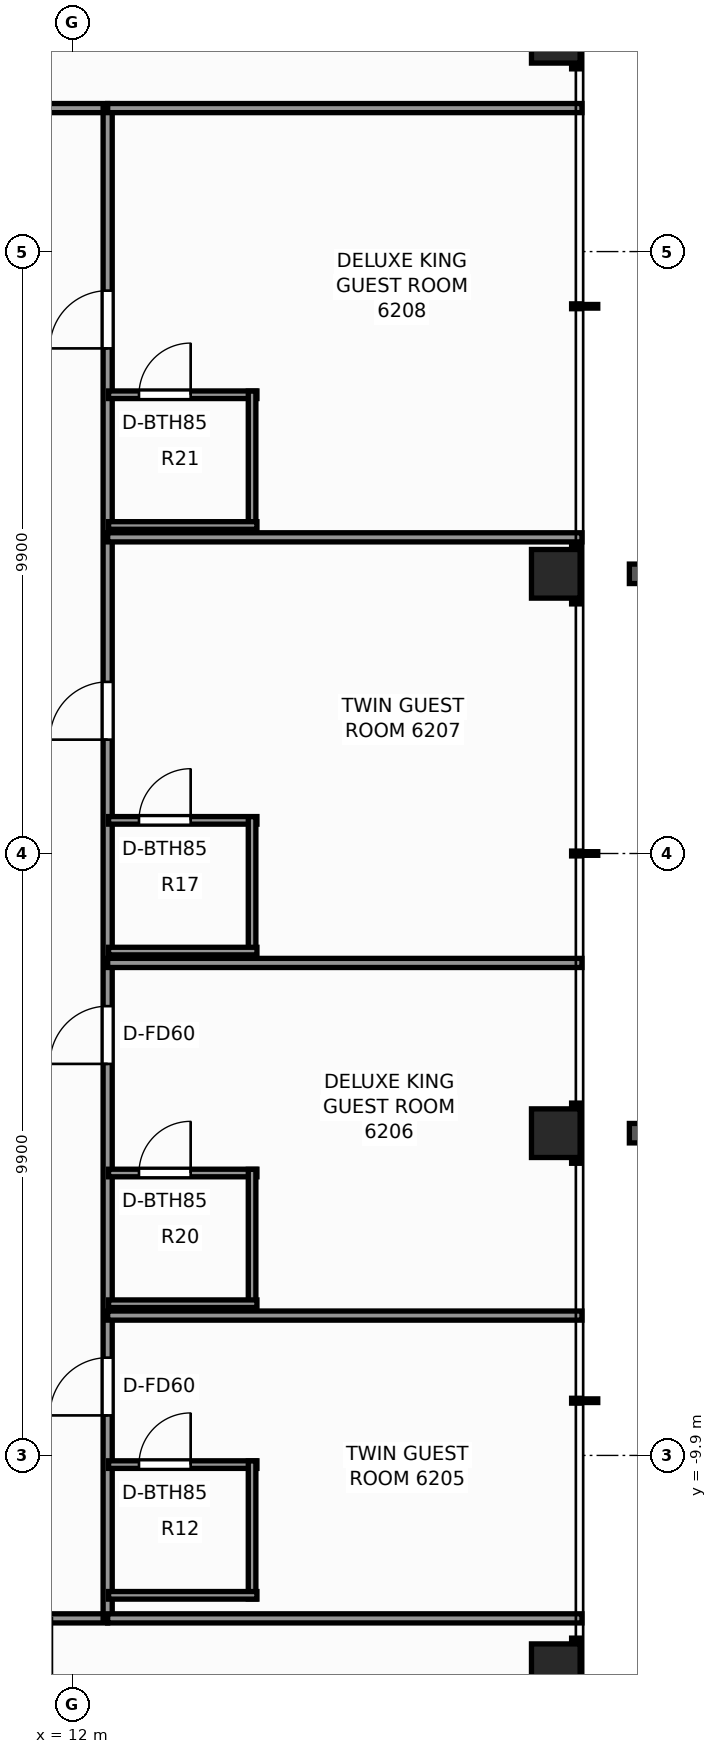
"""IFC4 building model, lengths in metres.
Left out: names, types, materials, properties, quantities, classifications, styles, units other than length and angle.
Written with IfcOpenShell. Run it as: python <this file> out.ifc"""

import sys

from ifc_helpers import new_model, si_unit, direction, frame, frame_2d, origin, origin_2d, place, context, subcontext, project, spatial, rectangle, extrude, element, fill, save


model = new_model("IFC4")
c1 = context("Model", 3, precision=1e-05, world=origin(), true_north=direction((0.0, 1.0)))
c2 = subcontext(c1, "Body", "Model", "MODEL_VIEW")
j1 = project(units=[si_unit("LENGTHUNIT", "METRE"), si_unit("PLANEANGLEUNIT", "RADIAN")], contexts=[c1])
p1 = place(None, origin())
s1 = spatial("IfcSite", under=j1, at=p1, CompositionType="ELEMENT")
p2 = place(p1, origin())
s2 = spatial("IfcBuilding", under=s1, at=p2, CompositionType="ELEMENT")
p3 = place(p2, frame((0.0, 0.0, 213.0)))
s3 = spatial("IfcBuildingStorey", under=s2, at=p3, CompositionType="ELEMENT", Elevation=213.0)
for number, where, z_axis, x_axis in (
    (1, (19.95, -13.4, 0.0), (0.0, 0.0, 1.0), (1.0, 0.0, 0.0)),
    (2, (19.95, -4.6, 0.0), (0.0, 0.0, 1.0), (1.0, 0.0, 0.0)),
    (3, (19.95, 4.6, 0.0), (0.0, 0.0, 1.0), (1.0, 0.0, 0.0)),
    (4, (19.95, 13.4, 0.0), (0.0, 0.0, 1.0), (1.0, 0.0, 0.0)),
):
    element("IfcColumn", number, at=place(p3, frame(where, z_axis=z_axis, x_axis=x_axis)), inside=s3, PredefinedType="COLUMN", context=c2, shape_type="SweptSolid", body=[
        extrude(rectangle(XDim=0.8, YDim=0.8, at=origin_2d()), origin(), (0.0, 0.0, 1.0), 3.3),
    ])
p4 = place(p3, frame((-12.58, -12.58, 0.0), z_axis=(0.0, 0.0, 1.0), x_axis=(1.0, 0.0, 0.0)))
e5 = element("IfcWall", 5, at=p4, inside=s3, PredefinedType="PARTITIONING", context=c2, shape_type="SweptSolid", body=[
    extrude(rectangle(XDim=25.16, YDim=0.15, at=frame_2d((12.58, 0.0))), origin(), (0.0, 0.0, 1.0), 2.369),
])
p5 = place(p4, frame((3.919, 0.0, 0.0)))
e6 = element("IfcOpeningElement", 6, at=p5, cuts=e5, PredefinedType="OPENING", context=c2, shape_type="SweptSolid", body=[
    extrude(rectangle(XDim=0.9, YDim=2.06, at=frame_2d((0.45, 1.03))), frame((0.0, 0.085, 0.0), z_axis=(0.0, -1.0, 0.0), x_axis=(1.0, 0.0, 0.0)), (0.0, 0.0, 1.0), 0.17),
])
p6 = place(p4, frame((8.951, 0.0, 0.0)))
e7 = element("IfcOpeningElement", 7, at=p6, cuts=e5, PredefinedType="OPENING", context=c2, shape_type="SweptSolid", body=[
    extrude(rectangle(XDim=0.9, YDim=2.06, at=frame_2d((0.45, 1.03))), frame((0.0, 0.085, 0.0), z_axis=(0.0, -1.0, 0.0), x_axis=(1.0, 0.0, 0.0)), (0.0, 0.0, 1.0), 0.17),
])
p7 = place(p4, frame((10.78, 0.0, 0.0)))
e8 = element("IfcOpeningElement", 8, at=p7, cuts=e5, PredefinedType="OPENING", context=c2, shape_type="SweptSolid", body=[
    extrude(rectangle(XDim=0.9, YDim=2.06, at=frame_2d((0.45, 1.03))), frame((0.0, 0.085, 0.0), z_axis=(0.0, -1.0, 0.0), x_axis=(1.0, 0.0, 0.0)), (0.0, 0.0, 1.0), 0.17),
])
p8 = place(p4, frame((13.749, 0.0, 0.0)))
e9 = element("IfcOpeningElement", 9, at=p8, cuts=e5, PredefinedType="OPENING", context=c2, shape_type="SweptSolid", body=[
    extrude(rectangle(XDim=0.95, YDim=2.06, at=frame_2d((0.475, 1.03))), frame((0.0, 0.085, 0.0), z_axis=(0.0, -1.0, 0.0), x_axis=(1.0, 0.0, 0.0)), (0.0, 0.0, 1.0), 0.17),
])
p9 = place(p4, frame((18.268, 0.0, 0.0)))
e10 = element("IfcOpeningElement", 10, at=p9, cuts=e5, PredefinedType="OPENING", context=c2, shape_type="SweptSolid", body=[
    extrude(rectangle(XDim=0.9, YDim=2.06, at=frame_2d((0.45, 1.03))), frame((0.0, 0.085, 0.0), z_axis=(0.0, -1.0, 0.0), x_axis=(1.0, 0.0, 0.0)), (0.0, 0.0, 1.0), 0.17),
])
p10 = place(p4, frame((20.283, 0.0, 0.0)))
e11 = element("IfcOpeningElement", 11, at=p10, cuts=e5, PredefinedType="OPENING", context=c2, shape_type="SweptSolid", body=[
    extrude(rectangle(XDim=0.95, YDim=2.06, at=frame_2d((0.475, 1.03))), frame((0.0, 0.085, 0.0), z_axis=(0.0, -1.0, 0.0), x_axis=(1.0, 0.0, 0.0)), (0.0, 0.0, 1.0), 0.17),
])
p11 = place(p3, frame((-12.58, 12.26, 0.0), z_axis=(0.0, 0.0, 1.0), x_axis=(1.0, 0.0, 0.0)))
e12 = element("IfcWall", 12, at=p11, inside=s3, PredefinedType="PARTITIONING", context=c2, shape_type="SweptSolid", body=[
    extrude(rectangle(XDim=25.16, YDim=0.15, at=frame_2d((12.58, 0.0))), origin(), (0.0, 0.0, 1.0), 2.369),
])
p12 = place(p11, frame((3.133, 0.0, 0.0)))
e13 = element("IfcOpeningElement", 13, at=p12, cuts=e12, PredefinedType="OPENING", context=c2, shape_type="SweptSolid", body=[
    extrude(rectangle(XDim=0.9, YDim=2.06, at=frame_2d((0.45, 1.03))), frame((0.0, 0.085, 0.0), z_axis=(0.0, -1.0, 0.0), x_axis=(1.0, 0.0, 0.0)), (0.0, 0.0, 1.0), 0.17),
])
p13 = place(p11, frame((9.188, 0.0, 0.0)))
e14 = element("IfcOpeningElement", 14, at=p13, cuts=e12, PredefinedType="OPENING", context=c2, shape_type="SweptSolid", body=[
    extrude(rectangle(XDim=0.95, YDim=2.06, at=frame_2d((0.475, 1.03))), frame((0.0, 0.085, 0.0), z_axis=(0.0, -1.0, 0.0), x_axis=(1.0, 0.0, 0.0)), (0.0, 0.0, 1.0), 0.17),
])
p14 = place(p11, frame((13.087, 0.0, 0.0)))
e15 = element("IfcOpeningElement", 15, at=p14, cuts=e12, PredefinedType="OPENING", context=c2, shape_type="SweptSolid", body=[
    extrude(rectangle(XDim=0.95, YDim=2.06, at=frame_2d((0.475, 1.03))), frame((0.0, 0.085, 0.0), z_axis=(0.0, -1.0, 0.0), x_axis=(1.0, 0.0, 0.0)), (0.0, 0.0, 1.0), 0.17),
])
p15 = place(p11, frame((19.665, 0.0, 0.0)))
e16 = element("IfcOpeningElement", 16, at=p15, cuts=e12, PredefinedType="OPENING", context=c2, shape_type="SweptSolid", body=[
    extrude(rectangle(XDim=0.9, YDim=2.06, at=frame_2d((0.45, 1.03))), frame((0.0, 0.085, 0.0), z_axis=(0.0, -1.0, 0.0), x_axis=(1.0, 0.0, 0.0)), (0.0, 0.0, 1.0), 0.17),
])
p16 = place(p3, frame((12.58, -12.58, 0.0), z_axis=(0.0, 0.0, 1.0), x_axis=(0.0, 1.0, 0.0)))
e17 = element("IfcWall", 17, at=p16, inside=s3, PredefinedType="PARTITIONING", context=c2, shape_type="SweptSolid", body=[
    extrude(rectangle(XDim=24.84, YDim=0.15, at=frame_2d((12.42, 0.0))), origin(), (0.0, 0.0, 1.0), 2.369),
])
p17 = place(p16, frame((3.338, 0.0, 0.0)))
e18 = element("IfcOpeningElement", 18, at=p17, cuts=e17, PredefinedType="OPENING", context=c2, shape_type="SweptSolid", body=[
    extrude(rectangle(XDim=0.95, YDim=2.06, at=frame_2d((0.475, 1.03))), frame((0.0, 0.085, 0.0), z_axis=(0.0, -1.0, 0.0), x_axis=(1.0, 0.0, 0.0)), (0.0, 0.0, 1.0), 0.17),
])
p18 = place(p16, frame((9.119, 0.0, 0.0)))
e19 = element("IfcOpeningElement", 19, at=p18, cuts=e17, PredefinedType="OPENING", context=c2, shape_type="SweptSolid", body=[
    extrude(rectangle(XDim=0.95, YDim=2.06, at=frame_2d((0.475, 1.03))), frame((0.0, 0.085, 0.0), z_axis=(0.0, -1.0, 0.0), x_axis=(1.0, 0.0, 0.0)), (0.0, 0.0, 1.0), 0.17),
])
p19 = place(p16, frame((14.452, 0.0, 0.0)))
e20 = element("IfcOpeningElement", 20, at=p19, cuts=e17, PredefinedType="OPENING", context=c2, shape_type="SweptSolid", body=[
    extrude(rectangle(XDim=0.95, YDim=2.06, at=frame_2d((0.475, 1.03))), frame((0.0, 0.085, 0.0), z_axis=(0.0, -1.0, 0.0), x_axis=(1.0, 0.0, 0.0)), (0.0, 0.0, 1.0), 0.17),
])
p20 = place(p16, frame((20.887, 0.0, 0.0)))
e21 = element("IfcOpeningElement", 21, at=p20, cuts=e17, PredefinedType="OPENING", context=c2, shape_type="SweptSolid", body=[
    extrude(rectangle(XDim=0.95, YDim=2.06, at=frame_2d((0.475, 1.03))), frame((0.0, 0.085, 0.0), z_axis=(0.0, -1.0, 0.0), x_axis=(1.0, 0.0, 0.0)), (0.0, 0.0, 1.0), 0.17),
])
for number, where, z_axis, x_axis in (
    (22, (12.58, -12.58, 0.0), (0.0, 0.0, 1.0), (1.0, 0.0, 0.0)),
    (23, (12.58, 12.26, 0.0), (0.0, 0.0, 1.0), (1.0, 0.0, 0.0)),
):
    element("IfcWall", number, at=place(p3, frame(where, z_axis=z_axis, x_axis=x_axis)), inside=s3, PredefinedType="PARTITIONING", context=c2, shape_type="SweptSolid", body=[
        extrude(rectangle(XDim=7.8, YDim=0.15, at=frame_2d((3.9, 0.0))), origin(), (0.0, 0.0, 1.0), 2.369),
    ])
p21 = place(p3, frame((12.58, -7.6, 0.0), z_axis=(0.0, 0.0, 1.0), x_axis=(1.0, 0.0, 0.0)))
e24 = element("IfcWall", 24, at=p21, inside=s3, PredefinedType="PARTITIONING", context=c2, shape_type="SweptSolid", body=[
    extrude(rectangle(XDim=7.8, YDim=0.15, at=frame_2d((3.9, 0.0))), origin(), (0.0, 0.0, 1.0), 2.453),
])
p22 = place(p3, frame((12.595, -10.051, 0.0), z_axis=(0.0, 0.0, 1.0), x_axis=(1.0, 0.0, 0.0)))
e25 = element("IfcWall", 25, at=p22, inside=s3, PredefinedType="PARTITIONING", context=c2, shape_type="SweptSolid", body=[
    extrude(rectangle(XDim=2.44, YDim=0.125, at=frame_2d((1.22, 0.0))), origin(), (0.0, 0.0, 1.0), 3.08),
])
p23 = place(p22, frame((0.5, 0.0, 0.0)))
e26 = element("IfcOpeningElement", 26, at=p23, cuts=e25, PredefinedType="OPENING", context=c2, shape_type="SweptSolid", body=[
    extrude(rectangle(XDim=0.85, YDim=2.03, at=frame_2d((0.425, 1.015))), frame((0.0, 0.073, 0.0), z_axis=(0.0, -1.0, 0.0), x_axis=(1.0, 0.0, 0.0)), (0.0, 0.0, 1.0), 0.145),
])
p24 = place(p3, frame((14.955, -12.261, 0.0), z_axis=(0.0, 0.0, 1.0), x_axis=(0.0, 1.0, 0.0)))
e27 = element("IfcWall", 27, at=p24, inside=s3, PredefinedType="PARTITIONING", context=c2, shape_type="SweptSolid", body=[
    extrude(rectangle(XDim=2.27, YDim=0.125, at=frame_2d((1.135, 0.0))), origin(), (0.0, 0.0, 1.0), 2.369),
])
p25 = place(p3, frame((12.595, -12.201, 0.0), z_axis=(0.0, 0.0, 1.0), x_axis=(1.0, 0.0, 0.0)))
e28 = element("IfcWall", 28, at=p25, inside=s3, PredefinedType="PARTITIONING", context=c2, shape_type="SweptSolid", body=[
    extrude(rectangle(XDim=2.44, YDim=0.125, at=frame_2d((1.22, 0.0))), origin(), (0.0, 0.0, 1.0), 3.08),
])
p26 = place(p3, frame((12.58, -1.8, 0.0), z_axis=(0.0, 0.0, 1.0), x_axis=(1.0, 0.0, 0.0)))
e29 = element("IfcWall", 29, at=p26, inside=s3, PredefinedType="PARTITIONING", context=c2, shape_type="SweptSolid", body=[
    extrude(rectangle(XDim=7.8, YDim=0.15, at=frame_2d((3.9, 0.0))), origin(), (0.0, 0.0, 1.0), 2.453),
])
p27 = place(p3, frame((12.595, -5.255, 0.0), z_axis=(0.0, 0.0, 1.0), x_axis=(1.0, 0.0, 0.0)))
e30 = element("IfcWall", 30, at=p27, inside=s3, PredefinedType="PARTITIONING", context=c2, shape_type="SweptSolid", body=[
    extrude(rectangle(XDim=2.44, YDim=0.125, at=frame_2d((1.22, 0.0))), origin(), (0.0, 0.0, 1.0), 3.08),
])
p28 = place(p27, frame((0.5, 0.0, 0.0)))
e31 = element("IfcOpeningElement", 31, at=p28, cuts=e30, PredefinedType="OPENING", context=c2, shape_type="SweptSolid", body=[
    extrude(rectangle(XDim=0.85, YDim=2.03, at=frame_2d((0.425, 1.015))), frame((0.0, 0.073, 0.0), z_axis=(0.0, -1.0, 0.0), x_axis=(1.0, 0.0, 0.0)), (0.0, 0.0, 1.0), 0.145),
])
p29 = place(p3, frame((14.955, -7.465, 0.0), z_axis=(0.0, 0.0, 1.0), x_axis=(0.0, 1.0, 0.0)))
e32 = element("IfcWall", 32, at=p29, inside=s3, PredefinedType="PARTITIONING", context=c2, shape_type="SweptSolid", body=[
    extrude(rectangle(XDim=2.27, YDim=0.125, at=frame_2d((1.135, 0.0))), origin(), (0.0, 0.0, 1.0), 3.08),
])
p30 = place(p3, frame((12.595, -7.405, 0.0), z_axis=(0.0, 0.0, 1.0), x_axis=(1.0, 0.0, 0.0)))
e33 = element("IfcWall", 33, at=p30, inside=s3, PredefinedType="PARTITIONING", context=c2, shape_type="SweptSolid", body=[
    extrude(rectangle(XDim=2.44, YDim=0.125, at=frame_2d((1.22, 0.0))), origin(), (0.0, 0.0, 1.0), 3.08),
])
p31 = place(p3, frame((12.58, 5.2, 0.0), z_axis=(0.0, 0.0, 1.0), x_axis=(1.0, 0.0, 0.0)))
e34 = element("IfcWall", 34, at=p31, inside=s3, PredefinedType="PARTITIONING", context=c2, shape_type="SweptSolid", body=[
    extrude(rectangle(XDim=7.8, YDim=0.15, at=frame_2d((3.9, 0.0))), origin(), (0.0, 0.0, 1.0), 2.453),
])
p32 = place(p3, frame((12.595, 0.545, 0.0), z_axis=(0.0, 0.0, 1.0), x_axis=(1.0, 0.0, 0.0)))
e35 = element("IfcWall", 35, at=p32, inside=s3, PredefinedType="PARTITIONING", context=c2, shape_type="SweptSolid", body=[
    extrude(rectangle(XDim=2.44, YDim=0.125, at=frame_2d((1.22, 0.0))), origin(), (0.0, 0.0, 1.0), 3.08),
])
p33 = place(p32, frame((0.5, 0.0, 0.0)))
e36 = element("IfcOpeningElement", 36, at=p33, cuts=e35, PredefinedType="OPENING", context=c2, shape_type="SweptSolid", body=[
    extrude(rectangle(XDim=0.85, YDim=2.03, at=frame_2d((0.425, 1.015))), frame((0.0, 0.073, 0.0), z_axis=(0.0, -1.0, 0.0), x_axis=(1.0, 0.0, 0.0)), (0.0, 0.0, 1.0), 0.145),
])
p34 = place(p3, frame((14.955, -1.665, 0.0), z_axis=(0.0, 0.0, 1.0), x_axis=(0.0, 1.0, 0.0)))
e37 = element("IfcWall", 37, at=p34, inside=s3, PredefinedType="PARTITIONING", context=c2, shape_type="SweptSolid", body=[
    extrude(rectangle(XDim=2.27, YDim=0.125, at=frame_2d((1.135, 0.0))), origin(), (0.0, 0.0, 1.0), 2.605),
])
p35 = place(p3, frame((12.595, -1.605, 0.0), z_axis=(0.0, 0.0, 1.0), x_axis=(1.0, 0.0, 0.0)))
e38 = element("IfcWall", 38, at=p35, inside=s3, PredefinedType="PARTITIONING", context=c2, shape_type="SweptSolid", body=[
    extrude(rectangle(XDim=2.44, YDim=0.125, at=frame_2d((1.22, 0.0))), origin(), (0.0, 0.0, 1.0), 3.08),
])
p36 = place(p3, frame((12.595, 7.545, 0.0), z_axis=(0.0, 0.0, 1.0), x_axis=(1.0, 0.0, 0.0)))
e39 = element("IfcWall", 39, at=p36, inside=s3, PredefinedType="PARTITIONING", context=c2, shape_type="SweptSolid", body=[
    extrude(rectangle(XDim=2.44, YDim=0.125, at=frame_2d((1.22, 0.0))), origin(), (0.0, 0.0, 1.0), 3.08),
])
p37 = place(p36, frame((0.5, 0.0, 0.0)))
e40 = element("IfcOpeningElement", 40, at=p37, cuts=e39, PredefinedType="OPENING", context=c2, shape_type="SweptSolid", body=[
    extrude(rectangle(XDim=0.85, YDim=2.03, at=frame_2d((0.425, 1.015))), frame((0.0, 0.073, 0.0), z_axis=(0.0, -1.0, 0.0), x_axis=(1.0, 0.0, 0.0)), (0.0, 0.0, 1.0), 0.145),
])
p38 = place(p3, frame((14.955, 5.335, 0.0), z_axis=(0.0, 0.0, 1.0), x_axis=(0.0, 1.0, 0.0)))
e41 = element("IfcWall", 41, at=p38, inside=s3, PredefinedType="PARTITIONING", context=c2, shape_type="SweptSolid", body=[
    extrude(rectangle(XDim=2.27, YDim=0.125, at=frame_2d((1.135, 0.0))), origin(), (0.0, 0.0, 1.0), 3.08),
])
p39 = place(p3, frame((12.595, 5.395, 0.0), z_axis=(0.0, 0.0, 1.0), x_axis=(1.0, 0.0, 0.0)))
e42 = element("IfcWall", 42, at=p39, inside=s3, PredefinedType="PARTITIONING", context=c2, shape_type="SweptSolid", body=[
    extrude(rectangle(XDim=2.44, YDim=0.125, at=frame_2d((1.22, 0.0))), origin(), (0.0, 0.0, 1.0), 3.08),
])
p40 = place(p23, origin())
e43 = element("IfcDoor", 43, at=p40, inside=s3, OperationType="SINGLE_SWING_RIGHT", PredefinedType="DOOR", context=c2, shape_type="SweptSolid", body=[
    extrude(rectangle(XDim=0.85, YDim=2.03, at=frame_2d((0.425, 1.015))), frame((0.0, 0.025, 0.0), z_axis=(0.0, -1.0, 0.0), x_axis=(1.0, 0.0, 0.0)), (0.0, 0.0, 1.0), 0.05),
])
fill(e26, e43)
p41 = place(p17, origin())
e44 = element("IfcDoor", 44, at=p41, inside=s3, OperationType="SINGLE_SWING_LEFT", PredefinedType="DOOR", context=c2, shape_type="SweptSolid", body=[
    extrude(rectangle(XDim=0.95, YDim=2.06, at=frame_2d((0.475, 1.03))), frame((0.0, 0.025, 0.0), z_axis=(0.0, -1.0, 0.0), x_axis=(1.0, 0.0, 0.0)), (0.0, 0.0, 1.0), 0.05),
])
fill(e18, e44)
p42 = place(p28, origin())
e45 = element("IfcDoor", 45, at=p42, inside=s3, OperationType="SINGLE_SWING_RIGHT", PredefinedType="DOOR", context=c2, shape_type="SweptSolid", body=[
    extrude(rectangle(XDim=0.85, YDim=2.03, at=frame_2d((0.425, 1.015))), frame((0.0, 0.025, 0.0), z_axis=(0.0, -1.0, 0.0), x_axis=(1.0, 0.0, 0.0)), (0.0, 0.0, 1.0), 0.05),
])
fill(e31, e45)
p43 = place(p18, origin())
e46 = element("IfcDoor", 46, at=p43, inside=s3, OperationType="SINGLE_SWING_LEFT", PredefinedType="DOOR", context=c2, shape_type="SweptSolid", body=[
    extrude(rectangle(XDim=0.95, YDim=2.06, at=frame_2d((0.475, 1.03))), frame((0.0, 0.025, 0.0), z_axis=(0.0, -1.0, 0.0), x_axis=(1.0, 0.0, 0.0)), (0.0, 0.0, 1.0), 0.05),
])
fill(e19, e46)
p44 = place(p33, origin())
e47 = element("IfcDoor", 47, at=p44, inside=s3, OperationType="SINGLE_SWING_RIGHT", PredefinedType="DOOR", context=c2, shape_type="SweptSolid", body=[
    extrude(rectangle(XDim=0.85, YDim=2.03, at=frame_2d((0.425, 1.015))), frame((0.0, 0.025, 0.0), z_axis=(0.0, -1.0, 0.0), x_axis=(1.0, 0.0, 0.0)), (0.0, 0.0, 1.0), 0.05),
])
fill(e36, e47)
p45 = place(p19, origin())
e48 = element("IfcDoor", 48, at=p45, inside=s3, OperationType="SINGLE_SWING_LEFT", PredefinedType="DOOR", context=c2, shape_type="SweptSolid", body=[
    extrude(rectangle(XDim=0.95, YDim=2.06, at=frame_2d((0.475, 1.03))), frame((0.0, 0.025, 0.0), z_axis=(0.0, -1.0, 0.0), x_axis=(1.0, 0.0, 0.0)), (0.0, 0.0, 1.0), 0.05),
])
fill(e20, e48)
p46 = place(p37, origin())
e49 = element("IfcDoor", 49, at=p46, inside=s3, OperationType="SINGLE_SWING_RIGHT", PredefinedType="DOOR", context=c2, shape_type="SweptSolid", body=[
    extrude(rectangle(XDim=0.85, YDim=2.03, at=frame_2d((0.425, 1.015))), frame((0.0, 0.025, 0.0), z_axis=(0.0, -1.0, 0.0), x_axis=(1.0, 0.0, 0.0)), (0.0, 0.0, 1.0), 0.05),
])
fill(e40, e49)
p47 = place(p20, origin())
e50 = element("IfcDoor", 50, at=p47, inside=s3, OperationType="SINGLE_SWING_LEFT", PredefinedType="DOOR", context=c2, shape_type="SweptSolid", body=[
    extrude(rectangle(XDim=0.95, YDim=2.06, at=frame_2d((0.475, 1.03))), frame((0.0, 0.025, 0.0), z_axis=(0.0, -1.0, 0.0), x_axis=(1.0, 0.0, 0.0)), (0.0, 0.0, 1.0), 0.05),
])
fill(e21, e50)
save(model, sys.argv[1])
